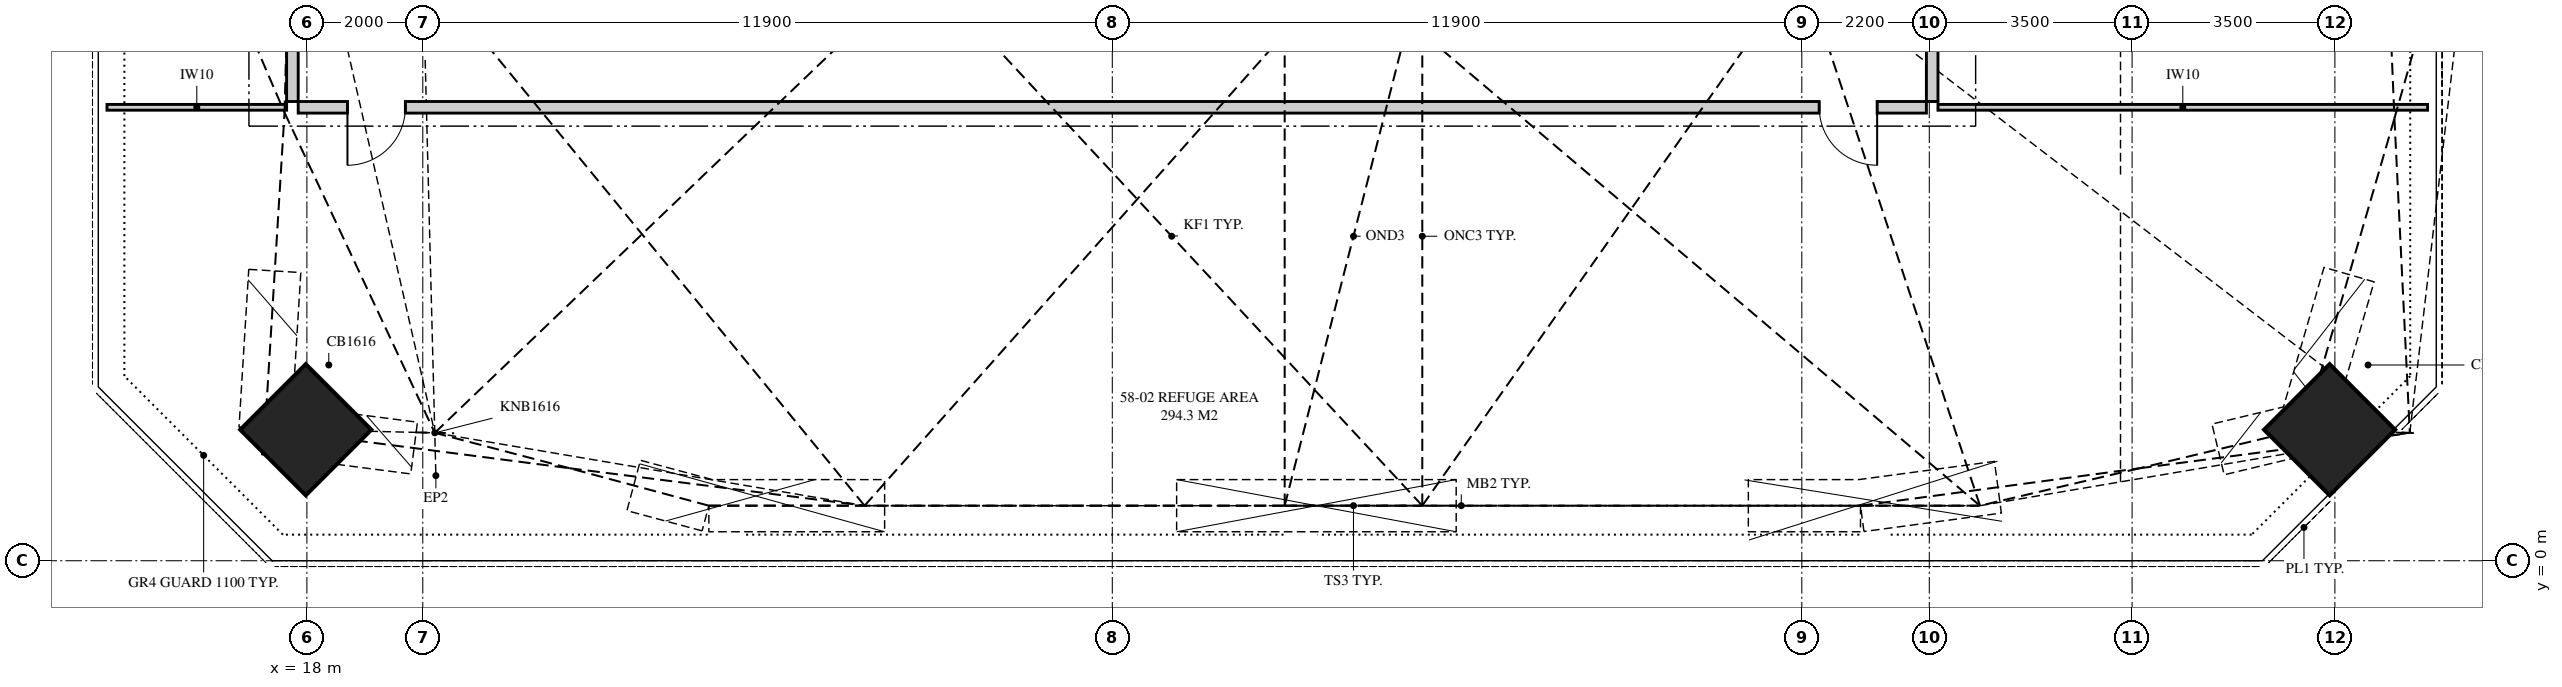
"""IFC4 building model, lengths in metres.
Left out: names, types, materials, properties, quantities, classifications, styles, units other than length and angle.
Written with IfcOpenShell. Run it as: python <this file> out.ifc"""

import sys

from ifc_helpers import new_model, si_unit, direction, frame, frame_2d, origin, origin_2d, place, context, subcontext, project, spatial, polyline, rectangle, hollow_rectangle, outline, extrude, element, fill, save


model = new_model("IFC4")
c1 = context("Model", 3, precision=1e-05, world=origin(), true_north=direction((0.0, 1.0)))
c2 = subcontext(c1, "Body", "Model", "MODEL_VIEW")
j1 = project(units=[si_unit("LENGTHUNIT", "METRE"), si_unit("PLANEANGLEUNIT", "RADIAN")], contexts=[c1])
p1 = place(None, origin())
s1 = spatial("IfcSite", under=j1, at=p1, CompositionType="ELEMENT")
p2 = place(p1, origin())
s2 = spatial("IfcBuilding", under=s1, at=p2, CompositionType="ELEMENT")
p3 = place(p2, frame((0.0, 0.0, 212.95)))
s3 = spatial("IfcBuildingStorey", under=s2, at=p3, CompositionType="ELEMENT", Elevation=212.95)
p4 = place(p3, frame((17.278, 2.278, 0.0), z_axis=(0.505446048478, -0.012216982335, 0.862771718023), x_axis=(0.5664055827, 0.759009479476, -0.321075265243)))
e1 = element("IfcColumn", 1, at=p4, inside=s3, PredefinedType="COLUMN", context=c2, shape_type="SweptSolid", body=[
    extrude(hollow_rectangle(XDim=1.6, YDim=1.6, WallThickness=0.125, at=origin_2d()), origin(), (0.0, 0.0, 1.0), 5.135),
])
p5 = place(p3, frame((52.472, 2.278, 0.0), z_axis=(0.342147435973, -0.013304204402, 0.939552090202), x_axis=(-0.641679954271, 0.727134908154, 0.243970616324)))
e2 = element("IfcColumn", 2, at=p5, inside=s3, PredefinedType="COLUMN", context=c2, shape_type="SweptSolid", body=[
    extrude(hollow_rectangle(XDim=1.6, YDim=1.6, WallThickness=0.125, at=origin_2d()), origin(), (0.0, 0.0, 1.0), 4.909),
])
p6 = place(p3, frame((17.85, 7.825, 0.0), z_axis=(0.0, 0.0, 1.0), x_axis=(1.0, 0.0, 0.0)))
e3 = element("IfcWall", 3, at=p6, inside=s3, PredefinedType="PARTITIONING", context=c2, shape_type="SweptSolid", body=[
    extrude(outline(polyline([(0.122, 1.271), (0.0, 1.25), (0.0, 0.0), (28.1, 0.0), (28.1, 4.72), (27.034, 4.72), (27.034, 4.141), (26.47, 4.141), (26.47, 4.72), (24.601, 4.72), (24.601, 4.141), (23.883, 4.141), (23.883, 4.72), (21.395, 4.72), (21.395, 4.141), (20.428, 4.141), (20.428, 4.72), (19.656, 4.72), (19.656, 4.245), (19.144, 4.245), (19.144, 4.72), (16.297, 4.72), (16.297, 4.141), (15.487, 4.141), (15.487, 4.72), (13.421, 4.72), (13.421, 4.141), (12.59, 4.141), (12.59, 4.72), (8.665, 4.72), (8.665, 4.141), (7.774, 4.141), (7.774, 4.72), (4.526, 4.72), (4.526, 4.141), (3.751, 4.141), (3.751, 4.72), (2.715, 4.72), (2.715, 3.52), (2.217, 3.52), (2.217, 3.5), (0.0, 3.5), (0.0, 2.283), (0.179, 2.283), (0.179, 2.258), (0.22, 2.258), (0.22, 1.377), (0.205, 1.363), (0.179, 1.334), (0.174, 1.292), (0.14, 1.291), (0.122, 1.271)]), holes=[polyline([(18.5, 3.316), (18.554, 3.43), (19.061, 3.496), (19.061, 3.004), (19.007, 2.889), (18.5, 2.824), (18.5, 3.316)])]), frame((0.0, 0.1, 0.0), z_axis=(0.0, -1.0, 0.0), x_axis=(1.0, 0.0, 0.0)), (0.0, 0.0, 1.0), 0.2),
])
p7 = place(p6, frame((0.85, 0.0, 0.0)))
e4 = element("IfcOpeningElement", 4, at=p7, cuts=e3, PredefinedType="OPENING", context=c2, shape_type="SweptSolid", body=[
    extrude(rectangle(XDim=1.0, YDim=2.1, at=frame_2d((0.5, 1.05))), frame((0.0, 0.11, 0.0), z_axis=(0.0, -1.0, 0.0), x_axis=(1.0, 0.0, 0.0)), (0.0, 0.0, 1.0), 0.22),
])
p8 = place(p6, frame((26.25, 0.0, 0.0)))
e5 = element("IfcOpeningElement", 5, at=p8, cuts=e3, PredefinedType="OPENING", context=c2, shape_type="SweptSolid", body=[
    extrude(rectangle(XDim=1.0, YDim=2.1, at=frame_2d((0.5, 1.05))), frame((0.0, 0.11, 0.0), z_axis=(0.0, -1.0, 0.0), x_axis=(1.0, 0.0, 0.0)), (0.0, 0.0, 1.0), 0.22),
])
p9 = place(p3, frame((17.75, 7.925, 0.0), z_axis=(0.0, 0.0, 1.0), x_axis=(0.0, 1.0, 0.0)))
e6 = element("IfcWall", 6, at=p9, inside=s3, PredefinedType="PARTITIONING", context=c2, shape_type="SweptSolid", body=[
    extrude(outline(polyline([(0.0, 0.0), (1.55, 0.0), (1.55, 1.362), (0.748, 1.362), (0.748, 0.918), (0.0, 0.918), (0.0, 0.0)])), frame((0.0, 0.1, 0.0), z_axis=(0.0, -1.0, 0.0), x_axis=(1.0, 0.0, 0.0)), (0.0, 0.0, 1.0), 0.2),
])
p10 = place(p3, frame((46.05, 7.925, 0.0), z_axis=(0.0, 0.0, 1.0), x_axis=(0.0, 1.0, 0.0)))
e7 = element("IfcWall", 7, at=p10, inside=s3, PredefinedType="PARTITIONING", context=c2, shape_type="SweptSolid", body=[
    extrude(outline(polyline([(0.0, 0.0), (1.55, 0.0), (1.55, 4.72), (1.307, 4.72), (1.307, 3.52), (0.0, 3.52), (0.0, 0.0)])), frame((0.0, 0.1, 0.0), z_axis=(0.0, -1.0, 0.0), x_axis=(1.0, 0.0, 0.0)), (0.0, 0.0, 1.0), 0.2),
])
p11 = place(p3, frame((14.55, 7.825, 0.0), z_axis=(0.0, 0.0, 1.0), x_axis=(1.0, 0.0, 0.0)))
e8 = element("IfcWall", 8, at=p11, inside=s3, PredefinedType="PARTITIONING", context=c2, shape_type="SweptSolid", body=[
    extrude(outline(polyline([(0.0, 0.0), (3.1, 0.0), (3.1, 1.143), (2.558, 1.143), (2.558, 2.031), (2.606, 2.083), (2.656, 2.092), (2.656, 2.192), (2.658, 2.249), (3.1, 2.255), (3.1, 4.72), (0.0, 4.72), (0.0, 0.0)])), frame((0.0, 0.05, 0.0), z_axis=(0.0, -1.0, 0.0), x_axis=(1.0, 0.0, 0.0)), (0.0, 0.0, 1.0), 0.1),
])
p12 = place(p3, frame((46.15, 7.825, 0.0), z_axis=(0.0, 0.0, 1.0), x_axis=(1.0, 0.0, 0.0)))
e9 = element("IfcWall", 9, at=p12, inside=s3, PredefinedType="PARTITIONING", context=c2, shape_type="SweptSolid", body=[
    extrude(outline(polyline([(1.701, 3.52), (0.0, 3.52), (0.0, 0.0), (8.45, 0.0), (8.45, 1.368), (8.282, 1.368), (8.282, 1.244), (8.277, 1.188), (7.457, 1.172), (7.457, 2.065), (7.46, 2.098), (7.46, 2.106), (7.461, 2.119), (7.492, 2.12), (7.492, 2.199), (7.524, 2.252), (8.372, 2.356), (8.45, 2.356), (8.45, 3.5), (7.73, 3.5), (7.73, 4.72), (4.41, 4.72), (4.41, 4.12), (1.89, 4.12), (1.89, 4.72), (1.701, 4.72), (1.701, 3.52)])), frame((0.0, 0.05, 0.0), z_axis=(0.0, -1.0, 0.0), x_axis=(1.0, 0.0, 0.0)), (0.0, 0.0, 1.0), 0.1),
])
p13 = place(p7, frame((1.0, 0.0, 0.0), z_axis=(0.0, 0.0, 1.0), x_axis=(-1.0, 0.0, 0.0)))
e10 = element("IfcDoor", 10, at=p13, inside=s3, OperationType="SINGLE_SWING_RIGHT", PredefinedType="DOOR", context=c2, shape_type="SweptSolid", body=[
    extrude(rectangle(XDim=1.0, YDim=2.1, at=frame_2d((0.5, 1.05))), frame((0.0, 0.025, 0.0), z_axis=(0.0, -1.0, 0.0), x_axis=(1.0, 0.0, 0.0)), (0.0, 0.0, 1.0), 0.05),
])
fill(e4, e10)
p14 = place(p8, frame((1.0, 0.0, 0.0), z_axis=(0.0, 0.0, 1.0), x_axis=(-1.0, 0.0, 0.0)))
e11 = element("IfcDoor", 11, at=p14, inside=s3, OperationType="SINGLE_SWING_LEFT", PredefinedType="DOOR", context=c2, shape_type="SweptSolid", body=[
    extrude(rectangle(XDim=1.0, YDim=2.1, at=frame_2d((0.5, 1.05))), frame((0.0, 0.025, 0.0), z_axis=(0.0, -1.0, 0.0), x_axis=(1.0, 0.0, 0.0)), (0.0, 0.0, 1.0), 0.05),
])
fill(e5, e11)
save(model, sys.argv[1])
